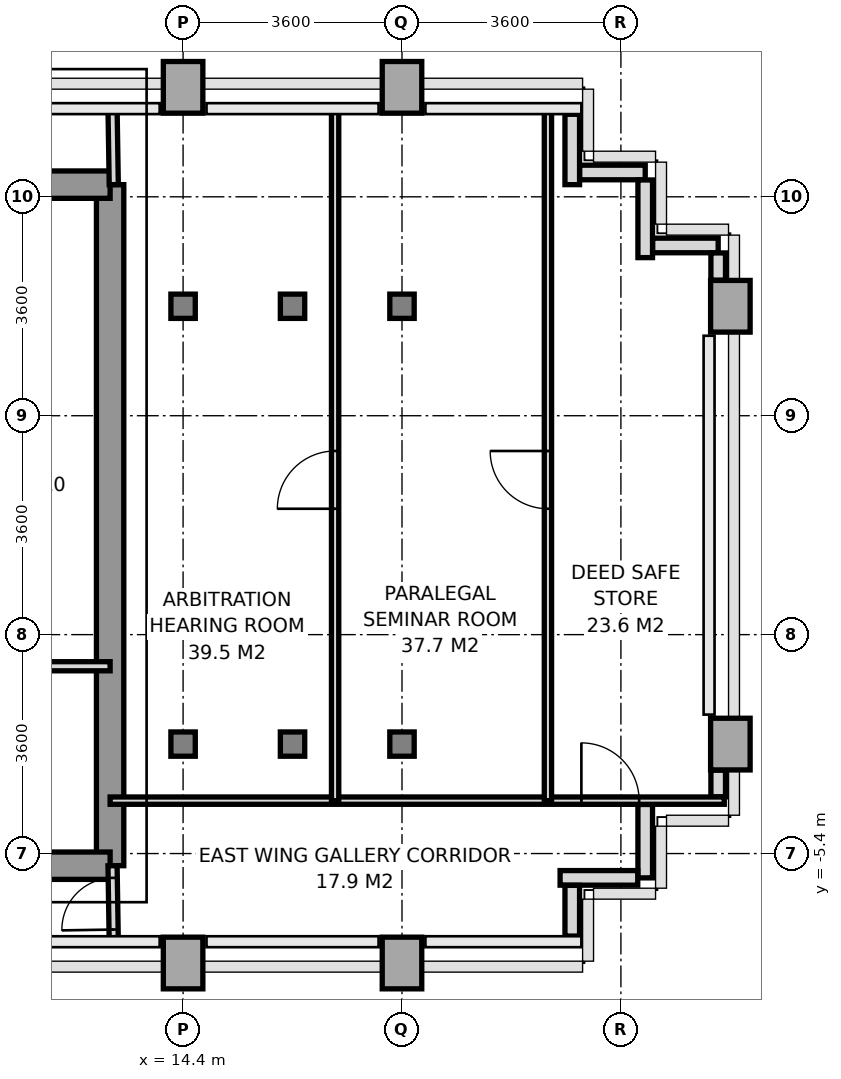
"""IFC4 building model, lengths in metres.
Left out: names, types, materials, properties, quantities, classifications, styles, units other than length and angle.
Written with IfcOpenShell. Run it as: python <this file> out.ifc"""

import sys

from ifc_helpers import new_model, si_unit, direction, frame, frame_2d, origin, origin_2d, place, context, subcontext, project, spatial, rectangle, i_section, extrude, source, transform, mapped, element, fill, save


model = new_model("IFC4")
c1 = context("Model", 3, precision=1e-05, world=origin(), true_north=direction((0.0, 1.0)))
c2 = subcontext(c1, "Body", "Model", "MODEL_VIEW")
j1 = project(units=[si_unit("LENGTHUNIT", "METRE"), si_unit("PLANEANGLEUNIT", "RADIAN")], contexts=[c1])
p1 = place(None, origin())
s1 = spatial("IfcSite", under=j1, at=p1, CompositionType="ELEMENT")
p2 = place(p1, origin())
s2 = spatial("IfcBuilding", under=s1, at=p2, CompositionType="ELEMENT")
p3 = place(p2, frame((0.0, 0.0, 131.2)))
s3 = spatial("IfcBuildingStorey", under=s2, at=p3, CompositionType="ELEMENT", Elevation=131.2)
m1 = source(origin(), c2, "Body", "SweptSolid", [
    extrude(rectangle(XDim=0.65, YDim=0.85, at=origin_2d()), origin(), (0.0, 0.0, 1.0), 3.2),
])
p4 = place(p3, frame((14.4, -7.2, 0.0), z_axis=(0.0, 0.0, 1.0), x_axis=(1.0, 0.0, 0.0)))
e1 = element("IfcColumn", 1, at=p4, inside=s3, PredefinedType="COLUMN", context=c2, shape_type="MappedRepresentation", body=[
    mapped(m1, transform((0.0, 0.0, 0.0), x_axis=(1.0, 0.0, 0.0), y_axis=(0.0, 1.0, 0.0), z_axis=(0.0, 0.0, 1.0), scale=1.0)),
])
m2 = source(origin(), c2, "Body", "SweptSolid", [
    extrude(i_section(OverallWidth=0.401, OverallDepth=0.399, WebThickness=0.02, FlangeThickness=0.032, at=origin_2d()), origin(), (0.0, 0.0, 1.0), 3.2),
])
for number, where, z_axis, x_axis in (
    (2, (14.4, -3.6, 0.0), (0.0, 0.0, 1.0), (1.0, 0.0, 0.0)),
    (3, (14.4, 3.6, 0.0), (0.0, 0.0, 1.0), (1.0, 0.0, 0.0)),
):
    element("IfcColumn", number, at=place(p3, frame(where, z_axis=z_axis, x_axis=x_axis)), inside=s3, PredefinedType="COLUMN", context=c2, shape_type="MappedRepresentation", body=[
        mapped(m2, transform((0.0, 0.0, 0.0), x_axis=(1.0, 0.0, 0.0), y_axis=(0.0, 1.0, 0.0), z_axis=(0.0, 0.0, 1.0), scale=1.0)),
    ])
p5 = place(p3, frame((14.4, 7.2, 0.0), z_axis=(0.0, 0.0, 1.0), x_axis=(1.0, 0.0, 0.0)))
e4 = element("IfcColumn", 4, at=p5, inside=s3, PredefinedType="COLUMN", context=c2, shape_type="MappedRepresentation", body=[
    mapped(m1, transform((0.0, 0.0, 0.0), x_axis=(1.0, 0.0, 0.0), y_axis=(0.0, 1.0, 0.0), z_axis=(0.0, 0.0, 1.0), scale=1.0)),
])
for number, where, z_axis, x_axis in (
    (5, (16.2, -3.6, 0.0), (0.0, 0.0, 1.0), (1.0, 0.0, 0.0)),
    (6, (16.2, 3.6, 0.0), (0.0, 0.0, 1.0), (1.0, 0.0, 0.0)),
):
    element("IfcColumn", number, at=place(p3, frame(where, z_axis=z_axis, x_axis=x_axis)), inside=s3, PredefinedType="COLUMN", context=c2, shape_type="MappedRepresentation", body=[
        mapped(m2, transform((0.0, 0.0, 0.0), x_axis=(1.0, 0.0, 0.0), y_axis=(0.0, 1.0, 0.0), z_axis=(0.0, 0.0, 1.0), scale=1.0)),
    ])
p6 = place(p3, frame((18.0, -7.2, 0.0), z_axis=(0.0, 0.0, 1.0), x_axis=(1.0, 0.0, 0.0)))
e7 = element("IfcColumn", 7, at=p6, inside=s3, PredefinedType="COLUMN", context=c2, shape_type="MappedRepresentation", body=[
    mapped(m1, transform((0.0, 0.0, 0.0), x_axis=(1.0, 0.0, 0.0), y_axis=(0.0, 1.0, 0.0), z_axis=(0.0, 0.0, 1.0), scale=1.0)),
])
for number, where, z_axis, x_axis in (
    (8, (18.0, -3.6, 0.0), (0.0, 0.0, 1.0), (1.0, 0.0, 0.0)),
    (9, (18.0, 3.6, 0.0), (0.0, 0.0, 1.0), (1.0, 0.0, 0.0)),
):
    element("IfcColumn", number, at=place(p3, frame(where, z_axis=z_axis, x_axis=x_axis)), inside=s3, PredefinedType="COLUMN", context=c2, shape_type="MappedRepresentation", body=[
        mapped(m2, transform((0.0, 0.0, 0.0), x_axis=(1.0, 0.0, 0.0), y_axis=(0.0, 1.0, 0.0), z_axis=(0.0, 0.0, 1.0), scale=1.0)),
    ])
for number, where, z_axis, x_axis in (
    (10, (18.0, 7.2, 0.0), (0.0, 0.0, 1.0), (1.0, 0.0, 0.0)),
    (11, (23.4, -3.6, 0.0), (0.0, 0.0, 1.0), (1.0, 0.0, 0.0)),
    (12, (23.4, 3.6, 0.0), (0.0, 0.0, 1.0), (1.0, 0.0, 0.0)),
):
    element("IfcColumn", number, at=place(p3, frame(where, z_axis=z_axis, x_axis=x_axis)), inside=s3, PredefinedType="COLUMN", context=c2, shape_type="MappedRepresentation", body=[
        mapped(m1, transform((0.0, 0.0, 0.0), x_axis=(1.0, 0.0, 0.0), y_axis=(0.0, 1.0, 0.0), z_axis=(0.0, 0.0, 1.0), scale=1.0)),
    ])
p7 = place(p3, frame((22.0, -4.593, 0.0), z_axis=(0.0, 0.0, 1.0), x_axis=(0.0, -1.0, 0.0)))
e13 = element("IfcWall", 13, at=p7, inside=s3, PredefinedType="PARAPET", context=c2, shape_type="SweptSolid", body=[
    extrude(rectangle(XDim=1.207, YDim=0.24, at=frame_2d((0.604, 0.0))), origin(), (0.0, 0.0, 1.0), 1.15),
])
p8 = place(p3, frame((21.877, -5.8, 0.0), z_axis=(0.0, 0.0, 1.0), x_axis=(-1.0, 0.0, 0.0)))
e14 = element("IfcWall", 14, at=p8, inside=s3, PredefinedType="PARAPET", context=c2, shape_type="SweptSolid", body=[
    extrude(rectangle(XDim=1.277, YDim=0.24, at=frame_2d((0.638, 0.0))), origin(), (0.0, 0.0, 1.0), 1.15),
])
p9 = place(p3, frame((20.8, -5.923, 0.0), z_axis=(0.0, 0.0, 1.0), x_axis=(0.0, -1.0, 0.0)))
e15 = element("IfcWall", 15, at=p9, inside=s3, PredefinedType="PARAPET", context=c2, shape_type="SweptSolid", body=[
    extrude(rectangle(XDim=0.834, YDim=0.24, at=frame_2d((0.417, 0.0))), origin(), (0.0, 0.0, 1.0), 1.15),
])
p10 = place(p3, frame((20.8, 6.757, 0.0), z_axis=(0.0, 0.0, 1.0), x_axis=(0.0, -1.0, 0.0)))
e16 = element("IfcWall", 16, at=p10, inside=s3, PredefinedType="PARAPET", context=c2, shape_type="SweptSolid", body=[
    extrude(rectangle(XDim=1.157, YDim=0.24, at=frame_2d((0.579, 0.0))), origin(), (0.0, 0.0, 1.0), 1.15),
])
p11 = place(p3, frame((20.923, 5.8, 0.0), z_axis=(0.0, 0.0, 1.0), x_axis=(1.0, 0.0, 0.0)))
e17 = element("IfcWall", 17, at=p11, inside=s3, PredefinedType="PARAPET", context=c2, shape_type="SweptSolid", body=[
    extrude(rectangle(XDim=1.077, YDim=0.24, at=frame_2d((0.539, 0.0))), origin(), (0.0, 0.0, 1.0), 1.15),
])
p12 = place(p3, frame((22.0, 5.677, 0.0), z_axis=(0.0, 0.0, 1.0), x_axis=(0.0, -1.0, 0.0)))
e18 = element("IfcWall", 18, at=p12, inside=s3, PredefinedType="PARAPET", context=c2, shape_type="SweptSolid", body=[
    extrude(rectangle(XDim=1.277, YDim=0.24, at=frame_2d((0.639, 0.0))), origin(), (0.0, 0.0, 1.0), 1.15),
])
p13 = place(p3, frame((22.123, 4.6, 0.0), z_axis=(0.0, 0.0, 1.0), x_axis=(1.0, 0.0, 0.0)))
e19 = element("IfcWall", 19, at=p13, inside=s3, PredefinedType="PARAPET", context=c2, shape_type="SweptSolid", body=[
    extrude(rectangle(XDim=1.077, YDim=0.24, at=frame_2d((0.539, 0.0))), origin(), (0.0, 0.0, 1.0), 1.15),
])
p14 = place(p3, frame((23.2, 4.477, 0.0), z_axis=(0.0, 0.0, 1.0), x_axis=(0.0, -1.0, 0.0)))
e20 = element("IfcWall", 20, at=p14, inside=s3, PredefinedType="PARAPET", context=c2, shape_type="SweptSolid", body=[
    extrude(rectangle(XDim=0.449, YDim=0.24, at=frame_2d((0.225, 0.0))), origin(), (0.0, 0.0, 1.0), 1.15),
])
p15 = place(p3, frame((23.2, -4.028, 0.0), z_axis=(0.0, 0.0, 1.0), x_axis=(0.0, -1.0, 0.0)))
e21 = element("IfcWall", 21, at=p15, inside=s3, PredefinedType="PARAPET", context=c2, shape_type="SweptSolid", body=[
    extrude(rectangle(XDim=0.439, YDim=0.24, at=frame_2d((0.219, 0.0))), origin(), (0.0, 0.0, 1.0), 1.15),
])
p16 = place(p3, frame((13.2, -5.6, 0.0), z_axis=(0.0, 0.0, 1.0), x_axis=(0.0, 1.0, 0.0)))
e22 = element("IfcWall", 22, at=p16, inside=s3, PredefinedType="SHEAR", context=c2, shape_type="SweptSolid", body=[
    extrude(rectangle(XDim=11.2, YDim=0.45, at=frame_2d((5.6, 0.0))), origin(), (0.0, 0.0, 1.0), 3.2),
])
p17 = place(p3, frame((11.381, 5.6, 0.0), z_axis=(0.0, 0.0, 1.0), x_axis=(1.0, 0.0, 0.0)))
e23 = element("IfcWall", 23, at=p17, inside=s3, PredefinedType="SHEAR", context=c2, shape_type="SweptSolid", body=[
    extrude(rectangle(XDim=1.819, YDim=0.45, at=frame_2d((0.909, 0.0))), origin(), (0.0, 0.0, 1.0), 3.2),
])
p18 = place(p3, frame((5.4, -5.6, 0.0), z_axis=(0.0, 0.0, 1.0), x_axis=(1.0, 0.0, 0.0)))
e24 = element("IfcWall", 24, at=p18, inside=s3, PredefinedType="SHEAR", context=c2, shape_type="SweptSolid", body=[
    extrude(rectangle(XDim=7.8, YDim=0.45, at=frame_2d((3.9, 0.0))), origin(), (0.0, 0.0, 1.0), 3.2),
])
p19 = place(p18, frame((3.0, 0.0, 0.0)))
e25 = element("IfcOpeningElement", 25, at=p19, cuts=e24, PredefinedType="OPENING", context=c2, shape_type="SweptSolid", body=[
    extrude(rectangle(XDim=1.2, YDim=2.2, at=frame_2d((0.6, 1.1))), frame((0.0, 0.235, 0.0), z_axis=(0.0, -1.0, 0.0), x_axis=(1.0, 0.0, 0.0)), (0.0, 0.0, 1.0), 0.47),
])
p20 = place(p18, frame((5.85, 0.0, 0.0)))
e26 = element("IfcOpeningElement", 26, at=p20, cuts=e24, PredefinedType="OPENING", context=c2, shape_type="SweptSolid", body=[
    extrude(rectangle(XDim=0.8, YDim=2.1, at=frame_2d((0.4, 1.05))), frame((0.0, 0.235, 0.0), z_axis=(0.0, -1.0, 0.0), x_axis=(1.0, 0.0, 0.0)), (0.0, 0.0, 1.0), 0.47),
])
p21 = place(p3, frame((11.02, -2.32, 0.0), z_axis=(0.0, 0.0, 1.0), x_axis=(1.0, 0.0, 0.0)))
e27 = element("IfcWall", 27, at=p21, inside=s3, PredefinedType="PARTITIONING", context=c2, shape_type="SweptSolid", body=[
    extrude(rectangle(XDim=2.18, YDim=0.15, at=frame_2d((1.09, 0.0))), origin(), (0.0, 0.0, 1.0), 3.2),
])
p22 = place(p3, frame((13.26, 5.6, 0.0), z_axis=(0.0, 0.0, 1.0), x_axis=(-0.016013571389, 0.999871774545, 0.0)))
e28 = element("IfcWall", 28, at=p22, inside=s3, PredefinedType="PARTITIONING", context=c2, shape_type="SweptSolid", body=[
    extrude(rectangle(XDim=1.25, YDim=0.15, at=frame_2d((0.625, 0.0))), origin(), (0.0, 0.0, 1.0), 3.2),
])
p23 = place(p3, frame((13.26, -6.85, 0.0), z_axis=(0.0, 0.0, 1.0), x_axis=(-0.016013571389, 0.999871774545, 0.0)))
e29 = element("IfcWall", 29, at=p23, inside=s3, PredefinedType="PARTITIONING", context=c2, shape_type="SweptSolid", body=[
    extrude(rectangle(XDim=1.25, YDim=0.15, at=frame_2d((0.625, 0.0))), origin(), (0.0, 0.0, 1.0), 3.2),
])
p24 = place(p23, frame((0.2, 0.0, 0.0)))
e30 = element("IfcOpeningElement", 30, at=p24, cuts=e29, PredefinedType="OPENING", context=c2, shape_type="SweptSolid", body=[
    extrude(rectangle(XDim=0.85, YDim=2.1, at=frame_2d((0.425, 1.05))), frame((0.0, 0.085, 0.0), z_axis=(0.0, -1.0, 0.0), x_axis=(1.0, 0.0, 0.0)), (0.0, 0.0, 1.0), 0.17),
])
p25 = place(p3, frame((13.2, -4.53, 0.0), z_axis=(0.0, 0.0, 1.0), x_axis=(1.0, 0.0, 0.0)))
e31 = element("IfcWall", 31, at=p25, inside=s3, PredefinedType="PARTITIONING", context=c2, shape_type="SweptSolid", body=[
    extrude(rectangle(XDim=10.1, YDim=0.12, at=frame_2d((5.05, 0.0))), origin(), (0.0, 0.0, 1.0), 2.76),
])
p26 = place(p25, frame((7.75, 0.0, 0.0)))
e32 = element("IfcOpeningElement", 32, at=p26, cuts=e31, PredefinedType="OPENING", context=c2, shape_type="SweptSolid", body=[
    extrude(rectangle(XDim=0.95, YDim=2.15, at=frame_2d((0.475, 1.075))), frame((0.0, 0.07, 0.0), z_axis=(0.0, -1.0, 0.0), x_axis=(1.0, 0.0, 0.0)), (0.0, 0.0, 1.0), 0.14),
])
p27 = place(p3, frame((16.9, -4.53, 0.0), z_axis=(0.0, 0.0, 1.0), x_axis=(0.0, 1.0, 0.0)))
e33 = element("IfcWall", 33, at=p27, inside=s3, PredefinedType="PARTITIONING", context=c2, shape_type="SweptSolid", body=[
    extrude(rectangle(XDim=11.38, YDim=0.12, at=frame_2d((5.69, 0.0))), origin(), (0.0, 0.0, 1.0), 2.7),
])
p28 = place(p27, frame((4.8, 0.0, 0.0)))
e34 = element("IfcOpeningElement", 34, at=p28, cuts=e33, PredefinedType="OPENING", context=c2, shape_type="SweptSolid", body=[
    extrude(rectangle(XDim=0.95, YDim=2.15, at=frame_2d((0.475, 1.075))), frame((0.0, 0.07, 0.0), z_axis=(0.0, -1.0, 0.0), x_axis=(1.0, 0.0, 0.0)), (0.0, 0.0, 1.0), 0.14),
])
p29 = place(p3, frame((20.4, -4.53, 0.0), z_axis=(0.0, 0.0, 1.0), x_axis=(0.0, 1.0, 0.0)))
e35 = element("IfcWall", 35, at=p29, inside=s3, PredefinedType="PARTITIONING", context=c2, shape_type="SweptSolid", body=[
    extrude(rectangle(XDim=11.38, YDim=0.12, at=frame_2d((5.69, 0.0))), origin(), (0.0, 0.0, 1.0), 2.7),
])
p30 = place(p29, frame((4.8, 0.0, 0.0)))
e36 = element("IfcOpeningElement", 36, at=p30, cuts=e35, PredefinedType="OPENING", context=c2, shape_type="SweptSolid", body=[
    extrude(rectangle(XDim=0.95, YDim=2.15, at=frame_2d((0.475, 1.075))), frame((0.0, 0.07, 0.0), z_axis=(0.0, -1.0, 0.0), x_axis=(1.0, 0.0, 0.0)), (0.0, 0.0, 1.0), 0.14),
])
m3 = source(origin(), c2, "Body", "SweptSolid", [
    extrude(rectangle(XDim=0.85, YDim=2.1, at=frame_2d((0.425, 1.05))), frame((0.0, 0.025, 0.0), z_axis=(0.0, -1.0, 0.0), x_axis=(1.0, 0.0, 0.0)), (0.0, 0.0, 1.0), 0.05),
])
p31 = place(p24, origin())
e37 = element("IfcDoor", 37, at=p31, inside=s3, OperationType="SINGLE_SWING_LEFT", PredefinedType="DOOR", context=c2, shape_type="MappedRepresentation", body=[
    mapped(m3, transform((0.0, 0.0, 0.0), x_axis=(1.0, 0.0, 0.0), y_axis=(0.0, 1.0, 0.0), z_axis=(0.0, 0.0, 1.0), scale=1.0)),
])
fill(e30, e37)
m4 = source(origin(), c2, "Body", "SweptSolid", [
    extrude(rectangle(XDim=0.95, YDim=2.15, at=frame_2d((0.475, 1.075))), frame((0.0, 0.025, 0.0), z_axis=(0.0, -1.0, 0.0), x_axis=(1.0, 0.0, 0.0)), (0.0, 0.0, 1.0), 0.05),
])
p32 = place(p28, origin())
e38 = element("IfcDoor", 38, at=p32, inside=s3, OperationType="SINGLE_SWING_LEFT", PredefinedType="DOOR", context=c2, shape_type="MappedRepresentation", body=[
    mapped(m4, transform((0.0, 0.0, 0.0), x_axis=(1.0, 0.0, 0.0), y_axis=(0.0, 1.0, 0.0), z_axis=(0.0, 0.0, 1.0), scale=1.0)),
])
fill(e34, e38)
p33 = place(p30, origin())
e39 = element("IfcDoor", 39, at=p33, inside=s3, OperationType="SINGLE_SWING_RIGHT", PredefinedType="DOOR", context=c2, shape_type="MappedRepresentation", body=[
    mapped(m4, transform((0.0, 0.0, 0.0), x_axis=(1.0, 0.0, 0.0), y_axis=(0.0, 1.0, 0.0), z_axis=(0.0, 0.0, 1.0), scale=1.0)),
])
fill(e36, e39)
p34 = place(p26, origin())
e40 = element("IfcDoor", 40, at=p34, inside=s3, OperationType="SINGLE_SWING_LEFT", PredefinedType="DOOR", context=c2, shape_type="MappedRepresentation", body=[
    mapped(m4, transform((0.0, 0.0, 0.0), x_axis=(1.0, 0.0, 0.0), y_axis=(0.0, 1.0, 0.0), z_axis=(0.0, 0.0, 1.0), scale=1.0)),
])
fill(e32, e40)
save(model, sys.argv[1])
